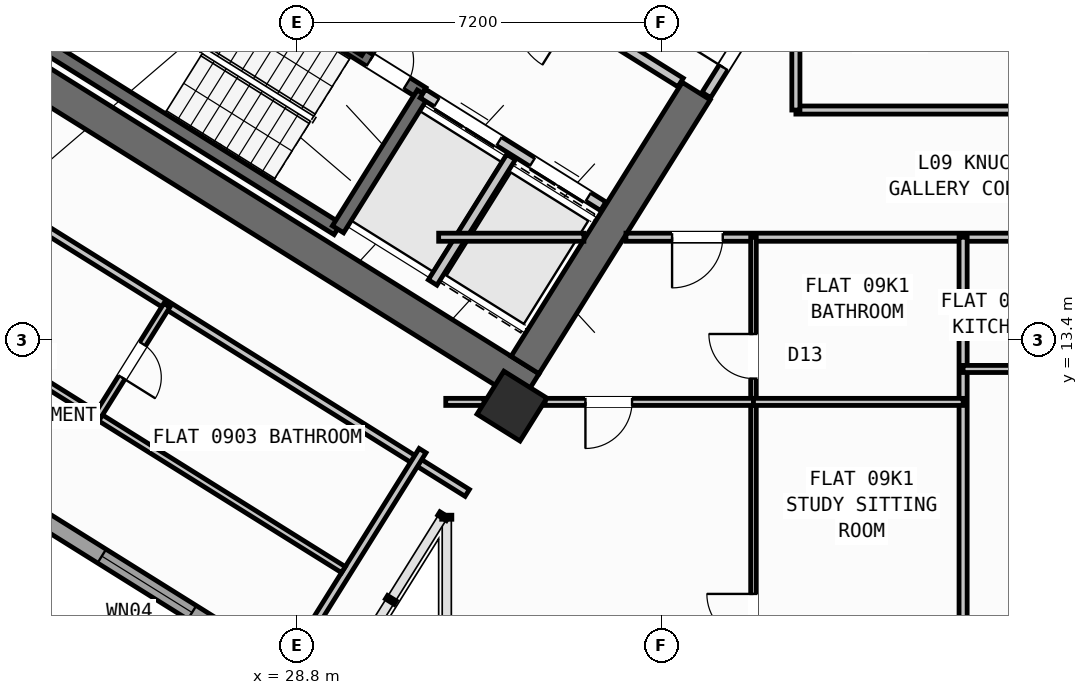
"""IFC4 building model, lengths in metres.
Left out: names, types, materials, properties, quantities, classifications, styles, units other than length and angle.
Written with IfcOpenShell. Run it as: python <this file> out.ifc"""

import sys

from ifc_helpers import new_model, si_unit, direction, frame, frame_2d, origin, origin_2d, place, context, subcontext, project, spatial, rectangle, hollow_rectangle, extrude, source, transform, mapped, element, fill, save


model = new_model("IFC4")
c1 = context("Model", 3, precision=1e-05, world=origin(), true_north=direction((0.0, 1.0)))
c2 = subcontext(c1, "Body", "Model", "MODEL_VIEW")
j1 = project(units=[si_unit("LENGTHUNIT", "METRE"), si_unit("PLANEANGLEUNIT", "RADIAN")], contexts=[c1])
p1 = place(None, origin())
s1 = spatial("IfcSite", under=j1, at=p1, CompositionType="ELEMENT")
p2 = place(p1, origin())
s2 = spatial("IfcBuilding", under=s1, at=p2, CompositionType="ELEMENT")
p3 = place(p2, frame((0.0, 0.0, 38.4)))
s3 = spatial("IfcBuildingStorey", under=s2, at=p3, CompositionType="ELEMENT", Elevation=38.4)
p4 = place(p3, frame((33.409, 12.45, 0.0), z_axis=(0.0, 0.0, 1.0), x_axis=(-0.848051132073, 0.529914405721, 0.0)))
e1 = element("IfcWall", 1, at=p4, inside=s3, PredefinedType="SHEAR", context=c2, shape_type="SweptSolid", body=[
    extrude(rectangle(XDim=13.24, YDim=0.65, at=frame_2d((6.62, 0.0))), origin(), (0.0, 0.0, 1.0), 3.35),
])
p5 = place(p3, frame((36.683, 18.304, 0.0), z_axis=(0.0, 0.0, 1.0), x_axis=(-0.529899109053, -0.848060690178, 0.0)))
e2 = element("IfcWall", 2, at=p5, inside=s3, PredefinedType="SHEAR", context=c2, shape_type="SweptSolid", body=[
    extrude(rectangle(XDim=6.375, YDim=0.65, at=frame_2d((3.188, 0.0))), origin(), (0.0, 0.0, 1.0), 3.35),
])
m1 = source(origin(), c2, "Body", "SweptSolid", [
    extrude(hollow_rectangle(XDim=1.0, YDim=1.0, WallThickness=0.04, at=origin_2d()), origin(), (0.0, 0.0, 1.0), 3.6),
])
p6 = place(p3, frame((33.046, 12.087, 0.0), z_axis=(0.0, 0.0, 1.0), x_axis=(-0.848048096156, 0.529919264233, 0.0)))
e3 = element("IfcColumn", 3, at=p6, inside=s3, PredefinedType="COLUMN", context=c2, shape_type="MappedRepresentation", body=[
    mapped(m1, transform((0.0, 0.0, 0.0), scale=1.0)),
])
p7 = place(p3, frame((29.268, 6.429, 0.0), z_axis=(0.0, 0.0, 1.0), x_axis=(-0.848049971435, 0.529916263149, 0.0)))
e4 = element("IfcWall", 4, at=p7, inside=s3, PredefinedType="STANDARD", context=c2, shape_type="SweptSolid", body=[
    extrude(rectangle(XDim=31.588, YDim=0.32, at=frame_2d((15.794, 0.0))), origin(), (0.0, 0.0, 1.0), 3.35),
])
p8 = place(p7, frame((16.362, 0.0, 0.0)))
e5 = element("IfcOpeningElement", 5, at=p8, cuts=e4, PredefinedType="OPENING", context=c2, shape_type="SweptSolid", body=[
    extrude(rectangle(XDim=1.2, YDim=2.15, at=frame_2d((0.6, 1.075))), frame((0.0, 0.17, 0.0), z_axis=(0.0, -1.0, 0.0), x_axis=(1.0, 0.0, 0.0)), (0.0, 0.0, 1.0), 0.34),
])
p9 = place(p7, frame((2.989, 0.0, 0.8)))
e6 = element("IfcOpeningElement", 6, at=p9, cuts=e4, PredefinedType="OPENING", context=c2, shape_type="SweptSolid", body=[
    extrude(rectangle(XDim=2.1, YDim=1.55, at=frame_2d((1.05, 0.775))), frame((0.0, 0.17, 0.0), z_axis=(0.0, -1.0, 0.0), x_axis=(1.0, 0.0, 0.0)), (0.0, 0.0, 1.0), 0.34),
])
p10 = place(p7, frame((8.359, 0.0, 0.8)))
e7 = element("IfcOpeningElement", 7, at=p10, cuts=e4, PredefinedType="OPENING", context=c2, shape_type="SweptSolid", body=[
    extrude(rectangle(XDim=2.1, YDim=1.55, at=frame_2d((1.05, 0.775))), frame((0.0, 0.17, 0.0), z_axis=(0.0, -1.0, 0.0), x_axis=(1.0, 0.0, 0.0)), (0.0, 0.0, 1.0), 0.34),
])
p11 = place(p7, frame((13.284, 0.0, 0.95)))
e8 = element("IfcOpeningElement", 8, at=p11, cuts=e4, PredefinedType="OPENING", context=c2, shape_type="SweptSolid", body=[
    extrude(rectangle(XDim=1.2, YDim=1.4, at=frame_2d((0.6, 0.7))), frame((0.0, 0.17, 0.0), z_axis=(0.0, -1.0, 0.0), x_axis=(1.0, 0.0, 0.0)), (0.0, 0.0, 1.0), 0.34),
])
p12 = place(p7, frame((20.39, 0.0, 0.95)))
e9 = element("IfcOpeningElement", 9, at=p12, cuts=e4, PredefinedType="OPENING", context=c2, shape_type="SweptSolid", body=[
    extrude(rectangle(XDim=1.2, YDim=1.4, at=frame_2d((0.6, 0.7))), frame((0.0, 0.17, 0.0), z_axis=(0.0, -1.0, 0.0), x_axis=(1.0, 0.0, 0.0)), (0.0, 0.0, 1.0), 0.34),
])
p13 = place(p7, frame((23.715, 0.0, 1.0)))
e10 = element("IfcOpeningElement", 10, at=p13, cuts=e4, PredefinedType="OPENING", context=c2, shape_type="SweptSolid", body=[
    extrude(rectangle(XDim=0.9, YDim=1.25, at=frame_2d((0.45, 0.625))), frame((0.0, 0.17, 0.0), z_axis=(0.0, -1.0, 0.0), x_axis=(1.0, 0.0, 0.0)), (0.0, 0.0, 1.0), 0.34),
])
p14 = place(p7, frame((27.481, 0.0, 0.8)))
e11 = element("IfcOpeningElement", 11, at=p14, cuts=e4, PredefinedType="OPENING", context=c2, shape_type="SweptSolid", body=[
    extrude(rectangle(XDim=2.1, YDim=1.55, at=frame_2d((1.05, 0.775))), frame((0.0, 0.17, 0.0), z_axis=(0.0, -1.0, 0.0), x_axis=(1.0, 0.0, 0.0)), (0.0, 0.0, 1.0), 0.34),
])
p15 = place(p3, frame((29.605, 15.581, 0.0), z_axis=(0.0, 0.0, 1.0), x_axis=(-0.848036911448, 0.529937163087, 0.0)))
e12 = element("IfcWall", 12, at=p15, inside=s3, PredefinedType="SHEAR", context=c2, shape_type="SweptSolid", body=[
    extrude(rectangle(XDim=7.46, YDim=0.26, at=frame_2d((3.73, 0.0))), origin(), (0.0, 0.0, 1.0), 3.35),
])
p16 = place(p3, frame((31.28, 18.261, 0.0), z_axis=(0.0, 0.0, 1.0), x_axis=(-0.848051618787, 0.529913626805, 0.0)))
e13 = element("IfcWall", 13, at=p16, inside=s3, PredefinedType="SHEAR", context=c2, shape_type="SweptSolid", body=[
    extrude(rectangle(XDim=7.46, YDim=0.26, at=frame_2d((3.73, 0.0))), origin(), (0.0, 0.0, 1.0), 3.35),
])
p17 = place(p16, frame((0.36, 0.0, 0.0)))
e14 = element("IfcOpeningElement", 14, at=p17, cuts=e13, PredefinedType="OPENING", context=c2, shape_type="SweptSolid", body=[
    extrude(rectangle(XDim=0.86, YDim=2.05, at=frame_2d((0.43, 1.025))), frame((0.0, 0.14, 0.0), z_axis=(0.0, -1.0, 0.0), x_axis=(1.0, 0.0, 0.0)), (0.0, 0.0, 1.0), 0.28),
])
p18 = place(p3, frame((31.288, 18.256, 0.0), z_axis=(0.0, 0.0, 1.0), x_axis=(-0.529943379326, -0.848033026897, 0.0)))
e15 = element("IfcWall", 15, at=p18, inside=s3, PredefinedType="SHEAR", context=c2, shape_type="SweptSolid", body=[
    extrude(rectangle(XDim=3.16, YDim=0.26, at=frame_2d((1.58, 0.0))), origin(), (0.0, 0.0, 1.0), 3.35),
])
p19 = place(p3, frame((34.848, 16.031, 0.0), z_axis=(0.0, 0.0, 1.0), x_axis=(-0.848044042236, 0.529925751807, 0.0)))
e16 = element("IfcWall", 16, at=p19, inside=s3, PredefinedType="STANDARD", context=c2, shape_type="SweptSolid", body=[
    extrude(rectangle(XDim=4.198, YDim=0.2, at=frame_2d((2.099, 0.0))), origin(), (0.0, 0.0, 1.0), 3.34),
])
p20 = place(p19, frame((0.348, 0.0, 0.0)))
e17 = element("IfcOpeningElement", 17, at=p20, cuts=e16, PredefinedType="OPENING", context=c2, shape_type="SweptSolid", body=[
    extrude(rectangle(XDim=1.3, YDim=2.2, at=frame_2d((0.65, 1.1))), frame((0.0, 0.11, 0.0), z_axis=(0.0, -1.0, 0.0), x_axis=(1.0, 0.0, 0.0)), (0.0, 0.0, 1.0), 0.22),
])
p21 = place(p19, frame((2.423, 0.0, 0.0)))
e18 = element("IfcOpeningElement", 18, at=p21, cuts=e16, PredefinedType="OPENING", context=c2, shape_type="SweptSolid", body=[
    extrude(rectangle(XDim=1.45, YDim=2.25, at=frame_2d((0.725, 1.125))), frame((0.0, 0.11, 0.0), z_axis=(0.0, -1.0, 0.0), x_axis=(1.0, 0.0, 0.0)), (0.0, 0.0, 1.0), 0.22),
])
p22 = place(p3, frame((36.374, 18.474, 0.0), z_axis=(0.0, 0.0, 1.0), x_axis=(-0.848051071577, 0.529914502535, 0.0)))
e19 = element("IfcWall", 19, at=p22, inside=s3, PredefinedType="STANDARD", context=c2, shape_type="SweptSolid", body=[
    extrude(rectangle(XDim=5.718, YDim=0.2, at=frame_2d((2.859, 0.0))), origin(), (0.0, 0.0, 1.0), 3.34),
])
p23 = place(p22, frame((2.498, 0.0, 0.0)))
e20 = element("IfcOpeningElement", 20, at=p23, cuts=e19, PredefinedType="OPENING", context=c2, shape_type="SweptSolid", body=[
    extrude(rectangle(XDim=1.15, YDim=2.1, at=frame_2d((0.575, 1.05))), frame((0.0, 0.11, 0.0), z_axis=(0.0, -1.0, 0.0), x_axis=(1.0, 0.0, 0.0)), (0.0, 0.0, 1.0), 0.22),
])
p24 = place(p3, frame((33.029, 17.003, 0.0), z_axis=(0.0, 0.0, 1.0), x_axis=(-0.529916267533, -0.848049968695, 0.0)))
e21 = element("IfcWall", 21, at=p24, inside=s3, PredefinedType="STANDARD", context=c2, shape_type="SweptSolid", body=[
    extrude(rectangle(XDim=2.92, YDim=0.2, at=frame_2d((1.46, 0.0))), origin(), (0.0, 0.0, 1.0), 3.34),
])
p25 = place(p3, frame((31.525, 21.504, 0.0), z_axis=(0.0, 0.0, 1.0), x_axis=(-0.529907497854, -0.848055448493, 0.0)))
e22 = element("IfcWall", 22, at=p25, inside=s3, PredefinedType="STANDARD", context=c2, shape_type="SweptSolid", body=[
    extrude(rectangle(XDim=2.88, YDim=0.2, at=frame_2d((1.44, 0.0))), origin(), (0.0, 0.0, 1.0), 3.34),
])
p26 = place(p3, frame((25.807, 29.582, 0.0), z_axis=(0.0, 0.0, 1.0), x_axis=(-0.529918119251, -0.84804881162, 0.0)))
e23 = element("IfcWall", 23, at=p26, inside=s3, PredefinedType="PARTITIONING", context=c2, shape_type="SweptSolid", body=[
    extrude(rectangle(XDim=17.65, YDim=0.16, at=frame_2d((8.825, 0.0))), origin(), (0.0, 0.0, 1.0), 3.34),
])
p27 = place(p3, frame((32.164, 10.374, 0.0), z_axis=(0.0, 0.0, 1.0), x_axis=(-0.848044107957, 0.529925646633, 0.0)))
e24 = element("IfcWall", 24, at=p27, inside=s3, PredefinedType="PARTITIONING", context=c2, shape_type="SweptSolid", body=[
    extrude(rectangle(XDim=15.57, YDim=0.16, at=frame_2d((7.785, 0.0))), origin(), (0.0, 0.0, 1.0), 3.34),
])
p28 = place(p27, frame((10.83, 0.0, 0.0)))
e25 = element("IfcOpeningElement", 25, at=p28, cuts=e24, PredefinedType="OPENING", context=c2, shape_type="SweptSolid", body=[
    extrude(rectangle(XDim=1.0, YDim=2.1, at=frame_2d((0.5, 1.05))), frame((0.0, 0.09, 0.0), z_axis=(0.0, -1.0, 0.0), x_axis=(1.0, 0.0, 0.0)), (0.0, 0.0, 1.0), 0.18),
])
p29 = place(p3, frame((31.282, 11.208, 0.0), z_axis=(0.0, 0.0, 1.0), x_axis=(-0.529938869374, -0.84803584519, 0.0)))
e26 = element("IfcWall", 26, at=p29, inside=s3, PredefinedType="PARTITIONING", context=c2, shape_type="SweptSolid", body=[
    extrude(rectangle(XDim=5.48, YDim=0.16, at=frame_2d((2.74, 0.0))), origin(), (0.0, 0.0, 1.0), 3.34),
])
p30 = place(p3, frame((29.72, 8.859, 0.0), z_axis=(0.0, 0.0, 1.0), x_axis=(-0.848049134363, 0.529917602752, 0.0)))
e27 = element("IfcWall", 27, at=p30, inside=s3, PredefinedType="PLUMBINGWALL", context=c2, shape_type="SweptSolid", body=[
    extrude(rectangle(XDim=14.3, YDim=0.14, at=frame_2d((7.15, 0.0))), origin(), (0.0, 0.0, 1.0), 3.34),
])
p31 = place(p30, frame((9.57, 0.0, 0.0)))
e28 = element("IfcOpeningElement", 28, at=p31, cuts=e27, PredefinedType="OPENING", context=c2, shape_type="SweptSolid", body=[
    extrude(rectangle(XDim=0.92, YDim=2.08, at=frame_2d((0.46, 1.04))), frame((0.0, 0.08, 0.0), z_axis=(0.0, -1.0, 0.0), x_axis=(1.0, 0.0, 0.0)), (0.0, 0.0, 1.0), 0.16),
])
p32 = place(p3, frame((26.237, 14.078, 0.0), z_axis=(0.0, 0.0, 1.0), x_axis=(-0.52995640672, -0.848024885824, 0.0)))
e29 = element("IfcWall", 29, at=p32, inside=s3, PredefinedType="PLUMBINGWALL", context=c2, shape_type="SweptSolid", body=[
    extrude(rectangle(XDim=2.58, YDim=0.14, at=frame_2d((1.29, 0.0))), origin(), (0.0, 0.0, 1.0), 3.34),
])
p33 = place(p32, frame((0.9, 0.0, 0.0)))
e30 = element("IfcOpeningElement", 30, at=p33, cuts=e29, PredefinedType="OPENING", context=c2, shape_type="SweptSolid", body=[
    extrude(rectangle(XDim=0.78, YDim=2.05, at=frame_2d((0.39, 1.025))), frame((0.0, 0.08, 0.0), z_axis=(0.0, -1.0, 0.0), x_axis=(1.0, 0.0, 0.0)), (0.0, 0.0, 1.0), 0.16),
])
p34 = place(p3, frame((38.451, 20.737, 0.0), z_axis=(0.0, 0.0, 1.0), x_axis=(-0.529924799939, -0.848044637038, 0.0)))
e31 = element("IfcWall", 31, at=p34, inside=s3, PredefinedType="STANDARD", context=c2, shape_type="SweptSolid", body=[
    extrude(rectangle(XDim=2.96, YDim=0.2, at=frame_2d((1.48, 0.0))), origin(), (0.0, 0.0, 1.0), 3.34),
])
p35 = place(p34, frame((1.46, 0.0, 0.0)))
e32 = element("IfcOpeningElement", 32, at=p35, cuts=e31, PredefinedType="OPENING", context=c2, shape_type="SweptSolid", body=[
    extrude(rectangle(XDim=0.86, YDim=2.05, at=frame_2d((0.43, 1.025))), frame((0.0, 0.11, 0.0), z_axis=(0.0, -1.0, 0.0), x_axis=(1.0, 0.0, 0.0)), (0.0, 0.0, 1.0), 0.22),
])
p36 = place(p3, frame((31.6, 15.42, 0.0), z_axis=(0.0, 0.0, 1.0), x_axis=(1.0, 0.0, 0.0)))
e33 = element("IfcWall", 33, at=p36, inside=s3, PredefinedType="PARTITIONING", context=c2, shape_type="SweptSolid", body=[
    extrude(rectangle(XDim=2.866, YDim=0.16, at=frame_2d((1.433, 0.0))), origin(), (0.0, 0.0, 1.0), 3.34),
])
p37 = place(p3, frame((35.296, 15.42, 0.0), z_axis=(0.0, 0.0, 1.0), x_axis=(1.0, 0.0, 0.0)))
e34 = element("IfcWall", 34, at=p37, inside=s3, PredefinedType="PARTITIONING", context=c2, shape_type="SweptSolid", body=[
    extrude(rectangle(XDim=15.311, YDim=0.16, at=frame_2d((7.655, 0.0))), origin(), (0.0, 0.0, 1.0), 3.34),
])
p38 = place(p37, frame((0.91, 0.0, 0.0)))
e35 = element("IfcOpeningElement", 35, at=p38, cuts=e34, PredefinedType="OPENING", context=c2, shape_type="SweptSolid", body=[
    extrude(rectangle(XDim=1.0, YDim=2.1, at=frame_2d((0.5, 1.05))), frame((0.0, 0.09, 0.0), z_axis=(0.0, -1.0, 0.0), x_axis=(1.0, 0.0, 0.0)), (0.0, 0.0, 1.0), 0.18),
])
p39 = place(p37, frame((8.74, 0.0, 0.0)))
e36 = element("IfcOpeningElement", 36, at=p39, cuts=e34, PredefinedType="OPENING", context=c2, shape_type="SweptSolid", body=[
    extrude(rectangle(XDim=1.0, YDim=2.1, at=frame_2d((0.5, 1.05))), frame((0.0, 0.09, 0.0), z_axis=(0.0, -1.0, 0.0), x_axis=(1.0, 0.0, 0.0)), (0.0, 0.0, 1.0), 0.18),
])
p40 = place(p3, frame((38.65, 17.93, 0.0), z_axis=(0.0, 0.0, 1.0), x_axis=(1.0, 0.0, 0.0)))
e37 = element("IfcWall", 37, at=p40, inside=s3, PredefinedType="PARTITIONING", context=c2, shape_type="SweptSolid", body=[
    extrude(rectangle(XDim=9.95, YDim=0.16, at=frame_2d((4.975, 0.0))), origin(), (0.0, 0.0, 1.0), 3.34),
])
p41 = place(p40, frame((4.475, 0.0, 0.0)))
e38 = element("IfcOpeningElement", 38, at=p41, cuts=e37, PredefinedType="OPENING", context=c2, shape_type="SweptSolid", body=[
    extrude(rectangle(XDim=1.0, YDim=2.1, at=frame_2d((0.5, 1.05))), frame((0.0, 0.09, 0.0), z_axis=(0.0, -1.0, 0.0), x_axis=(1.0, 0.0, 0.0)), (0.0, 0.0, 1.0), 0.18),
])
p42 = place(p3, frame((38.65, 17.93, 0.0), z_axis=(0.0, 0.0, 1.0), x_axis=(0.0, 1.0, 0.0)))
e39 = element("IfcWall", 39, at=p42, inside=s3, PredefinedType="PARTITIONING", context=c2, shape_type="SweptSolid", body=[
    extrude(rectangle(XDim=2.857, YDim=0.16, at=frame_2d((1.428, 0.0))), origin(), (0.0, 0.0, 1.0), 3.34),
])
p43 = place(p3, frame((41.95, 1.96, 0.0), z_axis=(0.0, 0.0, 1.0), x_axis=(0.0, 1.0, 0.0)))
e40 = element("IfcWall", 40, at=p43, inside=s3, PredefinedType="PARTITIONING", context=c2, shape_type="SweptSolid", body=[
    extrude(rectangle(XDim=13.46, YDim=0.16, at=frame_2d((6.73, 0.0))), origin(), (0.0, 0.0, 1.0), 3.34),
])
p44 = place(p3, frame((37.813, 1.96, 0.0), z_axis=(0.0, 0.0, 1.0), x_axis=(0.0, 1.0, 0.0)))
e41 = element("IfcWall", 41, at=p44, inside=s3, PredefinedType="PARTITIONING", context=c2, shape_type="SweptSolid", body=[
    extrude(rectangle(XDim=13.46, YDim=0.11, at=frame_2d((6.73, 0.0))), origin(), (0.0, 0.0, 1.0), 3.34),
])
p45 = place(p44, frame((5.5, 0.0, 0.0)))
e42 = element("IfcOpeningElement", 42, at=p45, cuts=e41, PredefinedType="OPENING", context=c2, shape_type="SweptSolid", body=[
    extrude(rectangle(XDim=0.92, YDim=2.08, at=frame_2d((0.46, 1.04))), frame((0.0, 0.065, 0.0), z_axis=(0.0, -1.0, 0.0), x_axis=(1.0, 0.0, 0.0)), (0.0, 0.0, 1.0), 0.13),
])
p46 = place(p44, frame((10.67, 0.0, 0.0)))
e43 = element("IfcOpeningElement", 43, at=p46, cuts=e41, PredefinedType="OPENING", context=c2, shape_type="SweptSolid", body=[
    extrude(rectangle(XDim=0.88, YDim=2.08, at=frame_2d((0.44, 1.04))), frame((0.0, 0.065, 0.0), z_axis=(0.0, -1.0, 0.0), x_axis=(1.0, 0.0, 0.0)), (0.0, 0.0, 1.0), 0.13),
])
p47 = place(p3, frame((31.74, 12.17, 0.0), z_axis=(0.0, 0.0, 1.0), x_axis=(1.0, 0.0, 0.0)))
e44 = element("IfcWall", 44, at=p47, inside=s3, PredefinedType="PLUMBINGWALL", context=c2, shape_type="SweptSolid", body=[
    extrude(rectangle(XDim=0.754, YDim=0.14, at=frame_2d((0.377, 0.0))), origin(), (0.0, 0.0, 1.0), 3.34),
])
p48 = place(p3, frame((33.702, 12.17, 0.0), z_axis=(0.0, 0.0, 1.0), x_axis=(1.0, 0.0, 0.0)))
e45 = element("IfcWall", 45, at=p48, inside=s3, PredefinedType="PLUMBINGWALL", context=c2, shape_type="SweptSolid", body=[
    extrude(rectangle(XDim=4.111, YDim=0.14, at=frame_2d((2.056, 0.0))), origin(), (0.0, 0.0, 1.0), 2.525),
])
p49 = place(p48, frame((0.795, 0.0, 0.0)))
e46 = element("IfcOpeningElement", 46, at=p49, cuts=e45, PredefinedType="OPENING", context=c2, shape_type="SweptSolid", body=[
    extrude(rectangle(XDim=0.92, YDim=2.08, at=frame_2d((0.46, 1.04))), frame((0.0, 0.08, 0.0), z_axis=(0.0, -1.0, 0.0), x_axis=(1.0, 0.0, 0.0)), (0.0, 0.0, 1.0), 0.16),
])
p50 = place(p3, frame((37.813, 12.17, 0.0), z_axis=(0.0, 0.0, 1.0), x_axis=(1.0, 0.0, 0.0)))
e47 = element("IfcWall", 47, at=p50, inside=s3, PredefinedType="PLUMBINGWALL", context=c2, shape_type="SweptSolid", body=[
    extrude(rectangle(XDim=4.137, YDim=0.14, at=frame_2d((2.068, 0.0))), origin(), (0.0, 0.0, 1.0), 2.525),
])
p51 = place(p3, frame((41.95, 12.82, 0.0), z_axis=(0.0, 0.0, 1.0), x_axis=(1.0, 0.0, 0.0)))
e48 = element("IfcWall", 48, at=p51, inside=s3, PredefinedType="PLUMBINGWALL", context=c2, shape_type="SweptSolid", body=[
    extrude(rectangle(XDim=5.122, YDim=0.14, at=frame_2d((2.561, 0.0))), origin(), (0.0, 0.0, 1.0), 2.525),
])
p52 = place(p51, frame((2.101, 0.0, 0.0)))
e49 = element("IfcOpeningElement", 49, at=p52, cuts=e48, PredefinedType="OPENING", context=c2, shape_type="SweptSolid", body=[
    extrude(rectangle(XDim=0.92, YDim=2.08, at=frame_2d((0.46, 1.04))), frame((0.0, 0.08, 0.0), z_axis=(0.0, -1.0, 0.0), x_axis=(1.0, 0.0, 0.0)), (0.0, 0.0, 1.0), 0.16),
])
m2 = source(origin(), c2, "Body", "SweptSolid", [
    extrude(rectangle(XDim=2.1, YDim=1.55, at=frame_2d((1.05, 0.775))), frame((0.0, 0.03, 0.0), z_axis=(0.0, -1.0, 0.0), x_axis=(1.0, 0.0, 0.0)), (0.0, 0.0, 1.0), 0.06),
])
p53 = place(p9, origin())
e50 = element("IfcWindow", 50, at=p53, inside=s3, PartitioningType="SINGLE_PANEL", PredefinedType="WINDOW", context=c2, shape_type="MappedRepresentation", body=[
    mapped(m2, transform((0.0, 0.0, 0.0), scale=1.0)),
])
fill(e6, e50)
m3 = source(origin(), c2, "Body", "SweptSolid", [
    extrude(rectangle(XDim=0.86, YDim=2.05, at=frame_2d((0.43, 1.025))), frame((0.0, 0.025, 0.0), z_axis=(0.0, -1.0, 0.0), x_axis=(1.0, 0.0, 0.0)), (0.0, 0.0, 1.0), 0.05),
])
p54 = place(p17, frame((0.86, 0.0, 0.0), z_axis=(0.0, 0.0, 1.0), x_axis=(-1.0, 0.0, 0.0)))
e51 = element("IfcDoor", 51, at=p54, inside=s3, OperationType="SINGLE_SWING_LEFT", PredefinedType="DOOR", context=c2, shape_type="MappedRepresentation", body=[
    mapped(m3, transform((0.0, 0.0, 0.0), scale=1.0)),
])
fill(e14, e51)
m4 = source(origin(), c2, "Body", "SweptSolid", [
    extrude(rectangle(XDim=1.3, YDim=2.2, at=frame_2d((0.65, 1.1))), frame((0.0, 0.025, 0.0), z_axis=(0.0, -1.0, 0.0), x_axis=(1.0, 0.0, 0.0)), (0.0, 0.0, 1.0), 0.05),
])
p55 = place(p20, origin())
e52 = element("IfcDoor", 52, at=p55, inside=s3, OperationType="DOUBLE_DOOR_SLIDING", PredefinedType="DOOR", context=c2, shape_type="MappedRepresentation", body=[
    mapped(m4, transform((0.0, 0.0, 0.0), scale=1.0)),
])
fill(e17, e52)
m5 = source(origin(), c2, "Body", "SweptSolid", [
    extrude(rectangle(XDim=1.45, YDim=2.25, at=frame_2d((0.725, 1.125))), frame((0.0, 0.025, 0.0), z_axis=(0.0, -1.0, 0.0), x_axis=(1.0, 0.0, 0.0)), (0.0, 0.0, 1.0), 0.05),
])
p56 = place(p21, origin())
e53 = element("IfcDoor", 53, at=p56, inside=s3, OperationType="DOUBLE_DOOR_SLIDING", PredefinedType="DOOR", context=c2, shape_type="MappedRepresentation", body=[
    mapped(m5, transform((0.0, 0.0, 0.0), scale=1.0)),
])
fill(e18, e53)
m6 = source(origin(), c2, "Body", "SweptSolid", [
    extrude(rectangle(XDim=0.78, YDim=2.05, at=frame_2d((0.39, 1.025))), frame((0.0, 0.025, 0.0), z_axis=(0.0, -1.0, 0.0), x_axis=(1.0, 0.0, 0.0)), (0.0, 0.0, 1.0), 0.05),
])
p57 = place(p33, origin())
e54 = element("IfcDoor", 54, at=p57, inside=s3, OperationType="SINGLE_SWING_RIGHT", PredefinedType="DOOR", context=c2, shape_type="MappedRepresentation", body=[
    mapped(m6, transform((0.0, 0.0, 0.0), scale=1.0)),
])
fill(e30, e54)
p58 = place(p35, frame((0.86, 0.0, 0.0), z_axis=(0.0, 0.0, 1.0), x_axis=(-1.0, 0.0, 0.0)))
e55 = element("IfcDoor", 55, at=p58, inside=s3, OperationType="SINGLE_SWING_LEFT", PredefinedType="DOOR", context=c2, shape_type="MappedRepresentation", body=[
    mapped(m3, transform((0.0, 0.0, 0.0), scale=1.0)),
])
fill(e32, e55)
m7 = source(origin(), c2, "Body", "SweptSolid", [
    extrude(rectangle(XDim=0.92, YDim=2.08, at=frame_2d((0.46, 1.04))), frame((0.0, 0.025, 0.0), z_axis=(0.0, -1.0, 0.0), x_axis=(1.0, 0.0, 0.0)), (0.0, 0.0, 1.0), 0.05),
])
p59 = place(p45, origin())
e56 = element("IfcDoor", 56, at=p59, inside=s3, OperationType="SINGLE_SWING_RIGHT", PredefinedType="DOOR", context=c2, shape_type="MappedRepresentation", body=[
    mapped(m7, transform((0.0, 0.0, 0.0), scale=1.0)),
])
fill(e42, e56)
m8 = source(origin(), c2, "Body", "SweptSolid", [
    extrude(rectangle(XDim=1.0, YDim=2.1, at=frame_2d((0.5, 1.05))), frame((0.0, 0.025, 0.0), z_axis=(0.0, -1.0, 0.0), x_axis=(1.0, 0.0, 0.0)), (0.0, 0.0, 1.0), 0.05),
])
p60 = place(p38, frame((1.0, 0.0, 0.0), z_axis=(0.0, 0.0, 1.0), x_axis=(-1.0, 0.0, 0.0)))
e57 = element("IfcDoor", 57, at=p60, inside=s3, OperationType="SINGLE_SWING_RIGHT", PredefinedType="DOOR", context=c2, shape_type="MappedRepresentation", body=[
    mapped(m8, transform((0.0, 0.0, 0.0), scale=1.0)),
])
fill(e35, e57)
p61 = place(p49, frame((0.92, 0.0, 0.0), z_axis=(0.0, 0.0, 1.0), x_axis=(-1.0, 0.0, 0.0)))
e58 = element("IfcDoor", 58, at=p61, inside=s3, OperationType="SINGLE_SWING_RIGHT", PredefinedType="DOOR", context=c2, shape_type="MappedRepresentation", body=[
    mapped(m7, transform((0.0, 0.0, 0.0), scale=1.0)),
])
fill(e46, e58)
m9 = source(origin(), c2, "Body", "SweptSolid", [
    extrude(rectangle(XDim=0.88, YDim=2.08, at=frame_2d((0.44, 1.04))), frame((0.0, 0.025, 0.0), z_axis=(0.0, -1.0, 0.0), x_axis=(1.0, 0.0, 0.0)), (0.0, 0.0, 1.0), 0.05),
])
p62 = place(p46, origin())
e59 = element("IfcDoor", 59, at=p62, inside=s3, OperationType="SINGLE_SWING_RIGHT", PredefinedType="DOOR", context=c2, shape_type="MappedRepresentation", body=[
    mapped(m9, transform((0.0, 0.0, 0.0), scale=1.0)),
])
fill(e43, e59)
save(model, sys.argv[1])
